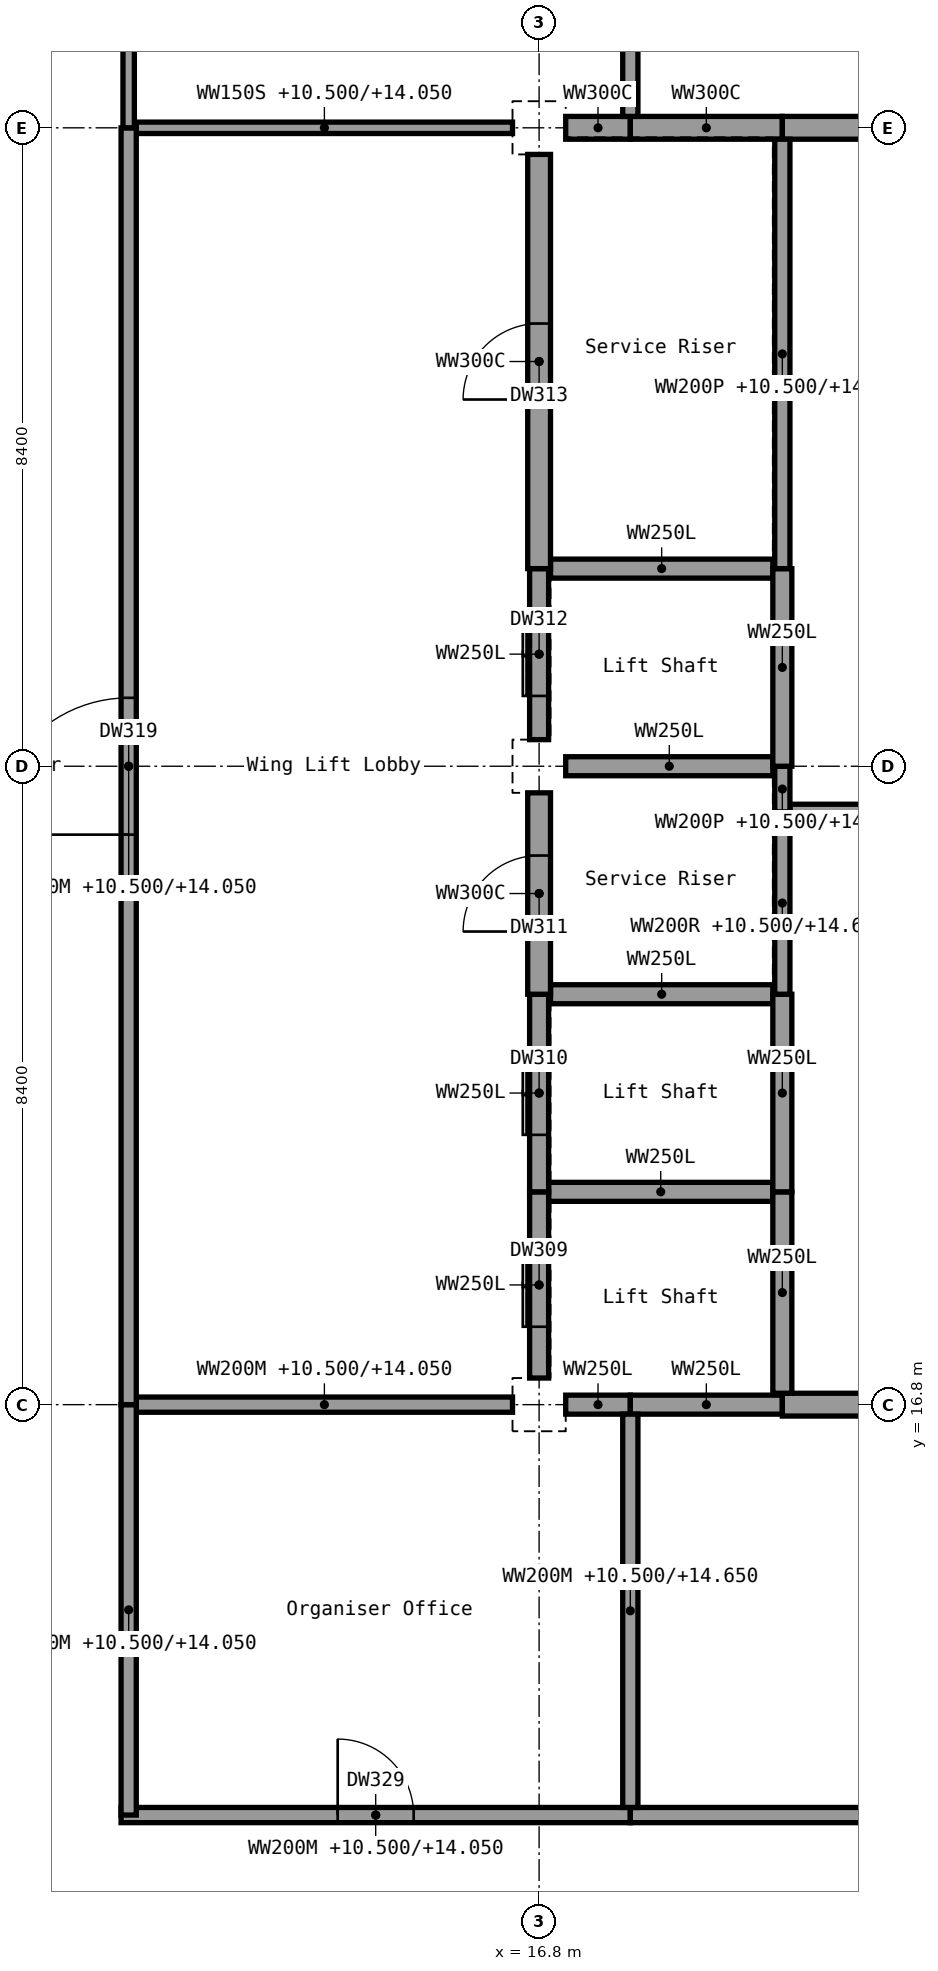
"""IFC4 building model, lengths in metres.
Left out: names, types, materials, properties, quantities, classifications, styles, units other than length and angle.
Written with IfcOpenShell. Run it as: python <this file> out.ifc"""

import sys

from ifc_helpers import new_model, si_unit, direction, frame, frame_2d, origin, origin_2d, place, context, subcontext, project, spatial, rectangle, extrude, element, fill, save


model = new_model("IFC4")
c1 = context("Model", 3, precision=1e-05, world=origin(), true_north=direction((0.0, 1.0)))
c2 = subcontext(c1, "Body", "Model", "MODEL_VIEW")
j1 = project(units=[si_unit("LENGTHUNIT", "METRE"), si_unit("PLANEANGLEUNIT", "RADIAN")], contexts=[c1])
p1 = place(None, origin())
s1 = spatial("IfcSite", under=j1, at=p1, CompositionType="ELEMENT")
p2 = place(p1, origin())
s2 = spatial("IfcBuilding", under=s1, at=p2, CompositionType="ELEMENT")
p3 = place(p2, frame((0.0, 0.0, 10.5)))
s3 = spatial("IfcBuildingStorey", under=s2, at=p3, CompositionType="ELEMENT", Elevation=10.5)
for number, where, z_axis, x_axis in (
    (1, (16.8, 16.8, 0.0), (0.0, 0.0, 1.0), (1.0, 0.0, 0.0)),
    (2, (16.8, 25.2, 0.0), (0.0, 0.0, 1.0), (1.0, 0.0, 0.0)),
    (3, (16.8, 33.6, 0.0), (0.0, 0.0, 1.0), (1.0, 0.0, 0.0)),
):
    element("IfcColumn", number, at=place(p3, frame(where, z_axis=z_axis, x_axis=x_axis)), inside=s3, PredefinedType="COLUMN", context=c2, shape_type="SweptSolid", body=[
        extrude(rectangle(XDim=0.7, YDim=0.7, at=origin_2d()), origin(), (0.0, 0.0, 1.0), 4.15),
    ])
p4 = place(p3, frame((11.3, 11.4, 0.0), z_axis=(0.0, 0.0, 1.0), x_axis=(1.0, 0.0, 0.0)))
e4 = element("IfcWall", 4, at=p4, inside=s3, PredefinedType="PARTITIONING", context=c2, shape_type="SweptSolid", body=[
    extrude(rectangle(XDim=6.7, YDim=0.2, at=frame_2d((3.35, 0.0))), origin(), (0.0, 0.0, 1.0), 3.55),
])
p5 = place(p4, frame((2.85, 0.0, 0.0)))
e5 = element("IfcOpeningElement", 5, at=p5, cuts=e4, PredefinedType="OPENING", context=c2, shape_type="SweptSolid", body=[
    extrude(rectangle(XDim=1.0, YDim=2.1, at=frame_2d((0.5, 1.05))), frame((0.0, 0.1, 0.0), z_axis=(0.0, -1.0, 0.0), x_axis=(1.0, 0.0, 0.0)), (0.0, 0.0, 1.0), 0.2),
])
p6 = place(p3, frame((18.0, 11.4, 0.0), z_axis=(0.0, 0.0, 1.0), x_axis=(1.0, 0.0, 0.0)))
e6 = element("IfcWall", 6, at=p6, inside=s3, PredefinedType="PARTITIONING", context=c2, shape_type="SweptSolid", body=[
    extrude(rectangle(XDim=12.0, YDim=0.2, at=frame_2d((6.0, 0.0))), origin(), (0.0, 0.0, 1.0), 3.55),
])
p7 = place(p6, frame((5.5, 0.0, 0.0)))
e7 = element("IfcOpeningElement", 7, at=p7, cuts=e6, PredefinedType="OPENING", context=c2, shape_type="SweptSolid", body=[
    extrude(rectangle(XDim=1.0, YDim=2.1, at=frame_2d((0.5, 1.05))), frame((0.0, 0.1, 0.0), z_axis=(0.0, -1.0, 0.0), x_axis=(1.0, 0.0, 0.0)), (0.0, 0.0, 1.0), 0.2),
])
p8 = place(p3, frame((11.5, 16.8, 0.0), z_axis=(0.0, 0.0, 1.0), x_axis=(1.0, 0.0, 0.0)))
e8 = element("IfcWall", 8, at=p8, inside=s3, PredefinedType="PARTITIONING", context=c2, shape_type="SweptSolid", body=[
    extrude(rectangle(XDim=4.95, YDim=0.2, at=frame_2d((2.475, 0.0))), origin(), (0.0, 0.0, 1.0), 3.55),
])
p9 = place(p3, frame((17.15, 16.8, 0.0), z_axis=(0.0, 0.0, 1.0), x_axis=(1.0, 0.0, 0.0)))
e9 = element("IfcWall", 9, at=p9, inside=s3, PredefinedType="SHEAR", context=c2, shape_type="SweptSolid", body=[
    extrude(rectangle(XDim=0.85, YDim=0.25, at=frame_2d((0.425, 0.0))), origin(), (0.0, 0.0, 1.0), 4.15),
])
p10 = place(p3, frame((18.0, 16.8, 0.0), z_axis=(0.0, 0.0, 1.0), x_axis=(1.0, 0.0, 0.0)))
e10 = element("IfcWall", 10, at=p10, inside=s3, PredefinedType="SHEAR", context=c2, shape_type="SweptSolid", body=[
    extrude(rectangle(XDim=2.0, YDim=0.25, at=frame_2d((1.0, 0.0))), origin(), (0.0, 0.0, 1.0), 4.15),
])
p11 = place(p3, frame((20.0, 16.8, 0.0), z_axis=(0.0, 0.0, 1.0), x_axis=(1.0, 0.0, 0.0)))
e11 = element("IfcWall", 11, at=p11, inside=s3, PredefinedType="SHEAR", context=c2, shape_type="SweptSolid", body=[
    extrude(rectangle(XDim=4.85, YDim=0.3, at=frame_2d((2.425, 0.0))), origin(), (0.0, 0.0, 1.0), 4.15),
])
p12 = place(p11, frame((1.925, 0.0, 0.0)))
e12 = element("IfcOpeningElement", 12, at=p12, cuts=e11, PredefinedType="OPENING", context=c2, shape_type="SweptSolid", body=[
    extrude(rectangle(XDim=1.0, YDim=2.1, at=frame_2d((0.5, 1.05))), frame((0.0, 0.15, 0.0), z_axis=(0.0, -1.0, 0.0), x_axis=(1.0, 0.0, 0.0)), (0.0, 0.0, 1.0), 0.3),
])
p13 = place(p3, frame((16.925, 19.6, 0.0), z_axis=(0.0, 0.0, 1.0), x_axis=(1.0, 0.0, 0.0)))
e13 = element("IfcWall", 13, at=p13, inside=s3, PredefinedType="SHEAR", context=c2, shape_type="SweptSolid", body=[
    extrude(rectangle(XDim=2.95, YDim=0.25, at=frame_2d((1.475, 0.0))), origin(), (0.0, 0.0, 1.0), 4.15),
])
p14 = place(p3, frame((16.95, 22.2, 0.0), z_axis=(0.0, 0.0, 1.0), x_axis=(1.0, 0.0, 0.0)))
e14 = element("IfcWall", 14, at=p14, inside=s3, PredefinedType="SHEAR", context=c2, shape_type="SweptSolid", body=[
    extrude(rectangle(XDim=2.925, YDim=0.25, at=frame_2d((1.462, 0.0))), origin(), (0.0, 0.0, 1.0), 4.15),
])
p15 = place(p3, frame((20.1, 24.6, 0.0), z_axis=(0.0, 0.0, 1.0), x_axis=(1.0, 0.0, 0.0)))
e15 = element("IfcWall", 15, at=p15, inside=s3, PredefinedType="SOLIDWALL", context=c2, shape_type="SweptSolid", body=[
    extrude(rectangle(XDim=6.7, YDim=0.2, at=frame_2d((3.35, 0.0))), origin(), (0.0, 0.0, 1.0), 4.15),
])
p16 = place(p3, frame((17.15, 25.2, 0.0), z_axis=(0.0, 0.0, 1.0), x_axis=(1.0, 0.0, 0.0)))
e16 = element("IfcWall", 16, at=p16, inside=s3, PredefinedType="SHEAR", context=c2, shape_type="SweptSolid", body=[
    extrude(rectangle(XDim=2.725, YDim=0.25, at=frame_2d((1.363, 0.0))), origin(), (0.0, 0.0, 1.0), 4.15),
])
p17 = place(p3, frame((16.95, 27.8, 0.0), z_axis=(0.0, 0.0, 1.0), x_axis=(1.0, 0.0, 0.0)))
e17 = element("IfcWall", 17, at=p17, inside=s3, PredefinedType="SHEAR", context=c2, shape_type="SweptSolid", body=[
    extrude(rectangle(XDim=2.925, YDim=0.25, at=frame_2d((1.462, 0.0))), origin(), (0.0, 0.0, 1.0), 4.15),
])
p18 = place(p3, frame((11.5, 33.6, 0.0), z_axis=(0.0, 0.0, 1.0), x_axis=(1.0, 0.0, 0.0)))
e18 = element("IfcWall", 18, at=p18, inside=s3, PredefinedType="PARTITIONING", context=c2, shape_type="SweptSolid", body=[
    extrude(rectangle(XDim=4.95, YDim=0.15, at=frame_2d((2.475, 0.0))), origin(), (0.0, 0.0, 1.0), 3.55),
])
p19 = place(p3, frame((17.15, 33.6, 0.0), z_axis=(0.0, 0.0, 1.0), x_axis=(1.0, 0.0, 0.0)))
e19 = element("IfcWall", 19, at=p19, inside=s3, PredefinedType="SHEAR", context=c2, shape_type="SweptSolid", body=[
    extrude(rectangle(XDim=0.85, YDim=0.3, at=frame_2d((0.425, 0.0))), origin(), (0.0, 0.0, 1.0), 4.15),
])
p20 = place(p3, frame((18.0, 33.6, 0.0), z_axis=(0.0, 0.0, 1.0), x_axis=(1.0, 0.0, 0.0)))
e20 = element("IfcWall", 20, at=p20, inside=s3, PredefinedType="SHEAR", context=c2, shape_type="SweptSolid", body=[
    extrude(rectangle(XDim=2.0, YDim=0.3, at=frame_2d((1.0, 0.0))), origin(), (0.0, 0.0, 1.0), 4.15),
])
p21 = place(p3, frame((20.0, 33.6, 0.0), z_axis=(0.0, 0.0, 1.0), x_axis=(1.0, 0.0, 0.0)))
e21 = element("IfcWall", 21, at=p21, inside=s3, PredefinedType="SHEAR", context=c2, shape_type="SweptSolid", body=[
    extrude(rectangle(XDim=4.85, YDim=0.3, at=frame_2d((2.425, 0.0))), origin(), (0.0, 0.0, 1.0), 4.15),
])
p22 = place(p21, frame((1.925, 0.0, 0.0)))
e22 = element("IfcOpeningElement", 22, at=p22, cuts=e21, PredefinedType="OPENING", context=c2, shape_type="SweptSolid", body=[
    extrude(rectangle(XDim=1.0, YDim=2.1, at=frame_2d((0.5, 1.05))), frame((0.0, 0.15, 0.0), z_axis=(0.0, -1.0, 0.0), x_axis=(1.0, 0.0, 0.0)), (0.0, 0.0, 1.0), 0.3),
])
p23 = place(p3, frame((11.4, 11.4, 0.0), z_axis=(0.0, 0.0, 1.0), x_axis=(0.0, 1.0, 0.0)))
e23 = element("IfcWall", 23, at=p23, inside=s3, PredefinedType="PARTITIONING", context=c2, shape_type="SweptSolid", body=[
    extrude(rectangle(XDim=5.4, YDim=0.2, at=frame_2d((2.7, 0.0))), origin(), (0.0, 0.0, 1.0), 3.55),
])
p24 = place(p3, frame((11.4, 16.8, 0.0), z_axis=(0.0, 0.0, 1.0), x_axis=(0.0, 1.0, 0.0)))
e24 = element("IfcWall", 24, at=p24, inside=s3, PredefinedType="PARTITIONING", context=c2, shape_type="SweptSolid", body=[
    extrude(rectangle(XDim=16.8, YDim=0.2, at=frame_2d((8.4, 0.0))), origin(), (0.0, 0.0, 1.0), 3.55),
])
p25 = place(p24, frame((7.5, 0.0, 0.0)))
e25 = element("IfcOpeningElement", 25, at=p25, cuts=e24, PredefinedType="OPENING", context=c2, shape_type="SweptSolid", body=[
    extrude(rectangle(XDim=1.8, YDim=2.1, at=frame_2d((0.9, 1.05))), frame((0.0, 0.1, 0.0), z_axis=(0.0, -1.0, 0.0), x_axis=(1.0, 0.0, 0.0)), (0.0, 0.0, 1.0), 0.2),
])
p26 = place(p3, frame((11.4, 33.6, 0.0), z_axis=(0.0, 0.0, 1.0), x_axis=(0.0, 1.0, 0.0)))
e26 = element("IfcWall", 26, at=p26, inside=s3, PredefinedType="PARTITIONING", context=c2, shape_type="SweptSolid", body=[
    extrude(rectangle(XDim=5.4, YDim=0.15, at=frame_2d((2.7, 0.0))), origin(), (0.0, 0.0, 1.0), 3.55),
])
p27 = place(p3, frame((16.8, 17.15, 0.0), z_axis=(0.0, 0.0, 1.0), x_axis=(0.0, 1.0, 0.0)))
e27 = element("IfcWall", 27, at=p27, inside=s3, PredefinedType="SHEAR", context=c2, shape_type="SweptSolid", body=[
    extrude(rectangle(XDim=2.45, YDim=0.25, at=frame_2d((1.225, 0.0))), origin(), (0.0, 0.0, 1.0), 4.15),
])
p28 = place(p27, frame((0.675, 0.0, 0.0)))
e28 = element("IfcOpeningElement", 28, at=p28, cuts=e27, PredefinedType="OPENING", context=c2, shape_type="SweptSolid", body=[
    extrude(rectangle(XDim=1.1, YDim=2.1, at=frame_2d((0.55, 1.05))), frame((0.0, 0.125, 0.0), z_axis=(0.0, -1.0, 0.0), x_axis=(1.0, 0.0, 0.0)), (0.0, 0.0, 1.0), 0.25),
])
p29 = place(p3, frame((16.8, 19.6, 0.0), z_axis=(0.0, 0.0, 1.0), x_axis=(0.0, 1.0, 0.0)))
e29 = element("IfcWall", 29, at=p29, inside=s3, PredefinedType="SHEAR", context=c2, shape_type="SweptSolid", body=[
    extrude(rectangle(XDim=2.6, YDim=0.25, at=frame_2d((1.3, 0.0))), origin(), (0.0, 0.0, 1.0), 4.15),
])
p30 = place(p29, frame((0.75, 0.0, 0.0)))
e30 = element("IfcOpeningElement", 30, at=p30, cuts=e29, PredefinedType="OPENING", context=c2, shape_type="SweptSolid", body=[
    extrude(rectangle(XDim=1.1, YDim=2.1, at=frame_2d((0.55, 1.05))), frame((0.0, 0.125, 0.0), z_axis=(0.0, -1.0, 0.0), x_axis=(1.0, 0.0, 0.0)), (0.0, 0.0, 1.0), 0.25),
])
p31 = place(p3, frame((16.8, 22.2, 0.0), z_axis=(0.0, 0.0, 1.0), x_axis=(0.0, 1.0, 0.0)))
e31 = element("IfcWall", 31, at=p31, inside=s3, PredefinedType="SHEAR", context=c2, shape_type="SweptSolid", body=[
    extrude(rectangle(XDim=2.65, YDim=0.3, at=frame_2d((1.325, 0.0))), origin(), (0.0, 0.0, 1.0), 4.15),
])
p32 = place(p31, frame((0.825, 0.0, 0.0)))
e32 = element("IfcOpeningElement", 32, at=p32, cuts=e31, PredefinedType="OPENING", context=c2, shape_type="SweptSolid", body=[
    extrude(rectangle(XDim=1.0, YDim=2.1, at=frame_2d((0.5, 1.05))), frame((0.0, 0.15, 0.0), z_axis=(0.0, -1.0, 0.0), x_axis=(1.0, 0.0, 0.0)), (0.0, 0.0, 1.0), 0.3),
])
p33 = place(p3, frame((16.8, 25.55, 0.0), z_axis=(0.0, 0.0, 1.0), x_axis=(0.0, 1.0, 0.0)))
e33 = element("IfcWall", 33, at=p33, inside=s3, PredefinedType="SHEAR", context=c2, shape_type="SweptSolid", body=[
    extrude(rectangle(XDim=2.25, YDim=0.25, at=frame_2d((1.125, 0.0))), origin(), (0.0, 0.0, 1.0), 4.15),
])
p34 = place(p33, frame((0.575, 0.0, 0.0)))
e34 = element("IfcOpeningElement", 34, at=p34, cuts=e33, PredefinedType="OPENING", context=c2, shape_type="SweptSolid", body=[
    extrude(rectangle(XDim=1.1, YDim=2.1, at=frame_2d((0.55, 1.05))), frame((0.0, 0.125, 0.0), z_axis=(0.0, -1.0, 0.0), x_axis=(1.0, 0.0, 0.0)), (0.0, 0.0, 1.0), 0.25),
])
p35 = place(p3, frame((16.8, 27.8, 0.0), z_axis=(0.0, 0.0, 1.0), x_axis=(0.0, 1.0, 0.0)))
e35 = element("IfcWall", 35, at=p35, inside=s3, PredefinedType="SHEAR", context=c2, shape_type="SweptSolid", body=[
    extrude(rectangle(XDim=5.45, YDim=0.3, at=frame_2d((2.725, 0.0))), origin(), (0.0, 0.0, 1.0), 4.15),
])
p36 = place(p35, frame((2.225, 0.0, 0.0)))
e36 = element("IfcOpeningElement", 36, at=p36, cuts=e35, PredefinedType="OPENING", context=c2, shape_type="SweptSolid", body=[
    extrude(rectangle(XDim=1.0, YDim=2.1, at=frame_2d((0.5, 1.05))), frame((0.0, 0.15, 0.0), z_axis=(0.0, -1.0, 0.0), x_axis=(1.0, 0.0, 0.0)), (0.0, 0.0, 1.0), 0.3),
])
p37 = place(p3, frame((18.0, 11.5, 0.0), z_axis=(0.0, 0.0, 1.0), x_axis=(0.0, 1.0, 0.0)))
e37 = element("IfcWall", 37, at=p37, inside=s3, PredefinedType="PARTITIONING", context=c2, shape_type="SweptSolid", body=[
    extrude(rectangle(XDim=5.175, YDim=0.2, at=frame_2d((2.587, 0.0))), origin(), (0.0, 0.0, 1.0), 4.15),
])
p38 = place(p3, frame((18.0, 33.75, 0.0), z_axis=(0.0, 0.0, 1.0), x_axis=(0.0, 1.0, 0.0)))
e38 = element("IfcWall", 38, at=p38, inside=s3, PredefinedType="SOLIDWALL", context=c2, shape_type="SweptSolid", body=[
    extrude(rectangle(XDim=5.15, YDim=0.2, at=frame_2d((2.575, 0.0))), origin(), (0.0, 0.0, 1.0), 4.15),
])
p39 = place(p3, frame((20.0, 16.95, 0.0), z_axis=(0.0, 0.0, 1.0), x_axis=(0.0, 1.0, 0.0)))
e39 = element("IfcWall", 39, at=p39, inside=s3, PredefinedType="SHEAR", context=c2, shape_type="SweptSolid", body=[
    extrude(rectangle(XDim=2.65, YDim=0.25, at=frame_2d((1.325, 0.0))), origin(), (0.0, 0.0, 1.0), 4.15),
])
p40 = place(p3, frame((20.0, 19.6, 0.0), z_axis=(0.0, 0.0, 1.0), x_axis=(0.0, 1.0, 0.0)))
e40 = element("IfcWall", 40, at=p40, inside=s3, PredefinedType="SHEAR", context=c2, shape_type="SweptSolid", body=[
    extrude(rectangle(XDim=2.6, YDim=0.25, at=frame_2d((1.3, 0.0))), origin(), (0.0, 0.0, 1.0), 4.15),
])
p41 = place(p3, frame((20.0, 22.2, 0.0), z_axis=(0.0, 0.0, 1.0), x_axis=(0.0, 1.0, 0.0)))
e41 = element("IfcWall", 41, at=p41, inside=s3, PredefinedType="SOLIDWALL", context=c2, shape_type="SweptSolid", body=[
    extrude(rectangle(XDim=2.4, YDim=0.2, at=frame_2d((1.2, 0.0))), origin(), (0.0, 0.0, 1.0), 4.15),
])
p42 = place(p3, frame((20.0, 24.6, 0.0), z_axis=(0.0, 0.0, 1.0), x_axis=(0.0, 1.0, 0.0)))
e42 = element("IfcWall", 42, at=p42, inside=s3, PredefinedType="SOLIDWALL", context=c2, shape_type="SweptSolid", body=[
    extrude(rectangle(XDim=0.6, YDim=0.2, at=frame_2d((0.3, 0.0))), origin(), (0.0, 0.0, 1.0), 4.15),
])
p43 = place(p3, frame((20.0, 25.2, 0.0), z_axis=(0.0, 0.0, 1.0), x_axis=(0.0, 1.0, 0.0)))
e43 = element("IfcWall", 43, at=p43, inside=s3, PredefinedType="SHEAR", context=c2, shape_type="SweptSolid", body=[
    extrude(rectangle(XDim=2.6, YDim=0.25, at=frame_2d((1.3, 0.0))), origin(), (0.0, 0.0, 1.0), 4.15),
])
p44 = place(p3, frame((20.0, 27.8, 0.0), z_axis=(0.0, 0.0, 1.0), x_axis=(0.0, 1.0, 0.0)))
e44 = element("IfcWall", 44, at=p44, inside=s3, PredefinedType="SOLIDWALL", context=c2, shape_type="SweptSolid", body=[
    extrude(rectangle(XDim=5.65, YDim=0.2, at=frame_2d((2.825, 0.0))), origin(), (0.0, 0.0, 1.0), 4.15),
])
p45 = place(p28, origin())
e45 = element("IfcDoor", 45, at=p45, inside=s3, OperationType="DOUBLE_DOOR_SLIDING", PredefinedType="DOOR", context=c2, shape_type="SweptSolid", body=[
    extrude(rectangle(XDim=1.1, YDim=2.1, at=frame_2d((0.55, 1.05))), frame((0.0, 0.025, 0.0), z_axis=(0.0, -1.0, 0.0), x_axis=(1.0, 0.0, 0.0)), (0.0, 0.0, 1.0), 0.05),
])
fill(e28, e45)
p46 = place(p30, origin())
e46 = element("IfcDoor", 46, at=p46, inside=s3, OperationType="DOUBLE_DOOR_SLIDING", PredefinedType="DOOR", context=c2, shape_type="SweptSolid", body=[
    extrude(rectangle(XDim=1.1, YDim=2.1, at=frame_2d((0.55, 1.05))), frame((0.0, 0.025, 0.0), z_axis=(0.0, -1.0, 0.0), x_axis=(1.0, 0.0, 0.0)), (0.0, 0.0, 1.0), 0.05),
])
fill(e30, e46)
p47 = place(p32, origin())
e47 = element("IfcDoor", 47, at=p47, inside=s3, OperationType="SINGLE_SWING_LEFT", PredefinedType="DOOR", context=c2, shape_type="SweptSolid", body=[
    extrude(rectangle(XDim=1.0, YDim=2.1, at=frame_2d((0.5, 1.05))), frame((0.0, 0.025, 0.0), z_axis=(0.0, -1.0, 0.0), x_axis=(1.0, 0.0, 0.0)), (0.0, 0.0, 1.0), 0.05),
])
fill(e32, e47)
p48 = place(p34, origin())
e48 = element("IfcDoor", 48, at=p48, inside=s3, OperationType="DOUBLE_DOOR_SLIDING", PredefinedType="DOOR", context=c2, shape_type="SweptSolid", body=[
    extrude(rectangle(XDim=1.1, YDim=2.1, at=frame_2d((0.55, 1.05))), frame((0.0, 0.025, 0.0), z_axis=(0.0, -1.0, 0.0), x_axis=(1.0, 0.0, 0.0)), (0.0, 0.0, 1.0), 0.05),
])
fill(e34, e48)
p49 = place(p36, origin())
e49 = element("IfcDoor", 49, at=p49, inside=s3, OperationType="SINGLE_SWING_LEFT", PredefinedType="DOOR", context=c2, shape_type="SweptSolid", body=[
    extrude(rectangle(XDim=1.0, YDim=2.1, at=frame_2d((0.5, 1.05))), frame((0.0, 0.025, 0.0), z_axis=(0.0, -1.0, 0.0), x_axis=(1.0, 0.0, 0.0)), (0.0, 0.0, 1.0), 0.05),
])
fill(e36, e49)
p50 = place(p25, origin())
e50 = element("IfcDoor", 50, at=p50, inside=s3, OperationType="DOUBLE_DOOR_DOUBLE_SWING", PredefinedType="DOOR", context=c2, shape_type="SweptSolid", body=[
    extrude(rectangle(XDim=1.8, YDim=2.1, at=frame_2d((0.9, 1.05))), frame((0.0, 0.025, 0.0), z_axis=(0.0, -1.0, 0.0), x_axis=(1.0, 0.0, 0.0)), (0.0, 0.0, 1.0), 0.05),
])
fill(e25, e50)
p51 = place(p5, origin())
e51 = element("IfcDoor", 51, at=p51, inside=s3, OperationType="SINGLE_SWING_LEFT", PredefinedType="DOOR", context=c2, shape_type="SweptSolid", body=[
    extrude(rectangle(XDim=1.0, YDim=2.1, at=frame_2d((0.5, 1.05))), frame((0.0, 0.025, 0.0), z_axis=(0.0, -1.0, 0.0), x_axis=(1.0, 0.0, 0.0)), (0.0, 0.0, 1.0), 0.05),
])
fill(e5, e51)
save(model, sys.argv[1])
